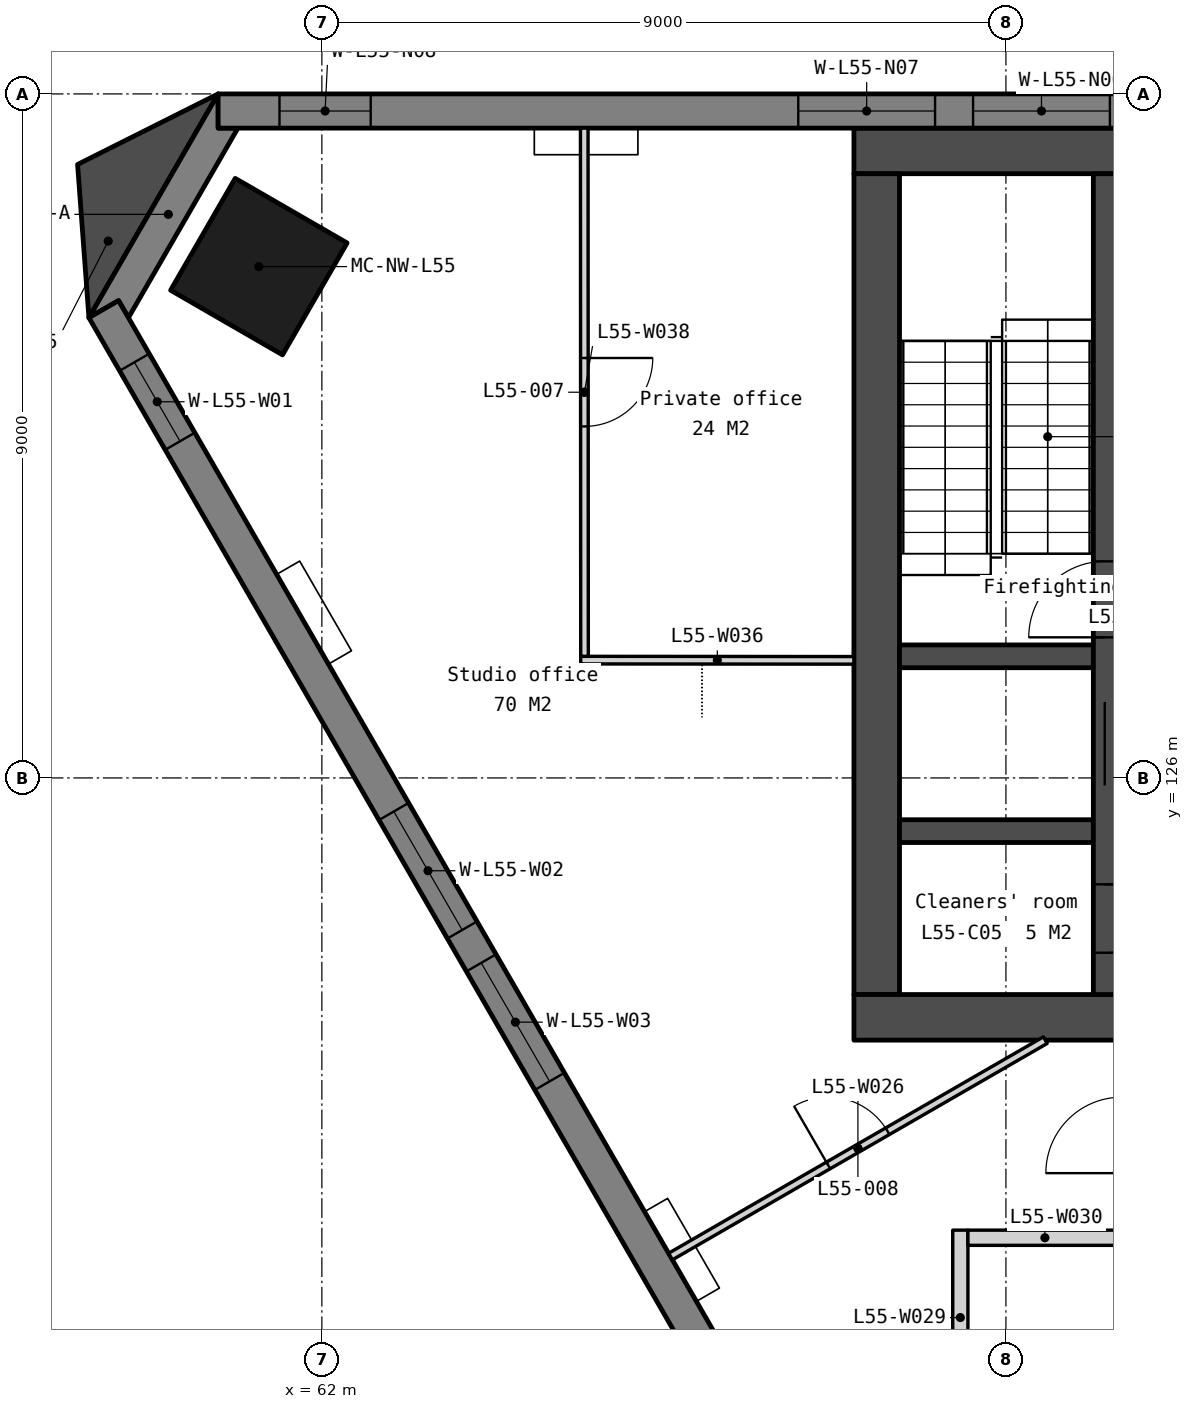
"""IFC4 building model, lengths in metres.
Left out: names, types, materials, properties, quantities, classifications, styles, units other than length and angle.
Written with IfcOpenShell. Run it as: python <this file> out.ifc"""

import sys

from ifc_helpers import new_model, si_unit, direction, frame, frame_2d, origin, origin_2d, place, context, subcontext, project, spatial, polyline, rectangle, outline, extrude, element, fill, save


model = new_model("IFC4")
c1 = context("Model", 3, precision=1e-05, world=origin(), true_north=direction((0.0, 1.0)))
c2 = subcontext(c1, "Body", "Model", "MODEL_VIEW")
j1 = project(units=[si_unit("LENGTHUNIT", "METRE"), si_unit("PLANEANGLEUNIT", "RADIAN")], contexts=[c1])
p1 = place(None, origin())
s1 = spatial("IfcSite", under=j1, at=p1, CompositionType="ELEMENT")
p2 = place(p1, origin())
s2 = spatial("IfcBuilding", under=s1, at=p2, CompositionType="ELEMENT")
p3 = place(p2, frame((0.0, 0.0, 219.2)))
s3 = spatial("IfcBuildingStorey", under=s2, at=p3, CompositionType="ELEMENT", Elevation=219.2)
p4 = place(p3, frame((61.171, 132.728, 0.0), z_axis=(0.0, 0.0, 1.0), x_axis=(-0.5, -0.866025403784, 0.0)))
e1 = element("IfcColumn", 1, at=p4, inside=s3, PredefinedType="COLUMN", context=c2, shape_type="SweptSolid", body=[
    extrude(rectangle(XDim=1.7, YDim=1.7, at=origin_2d()), origin(), (0.0, 0.0, 1.0), 3.9),
])
p5 = place(p3, frame((69.0, 134.25, 0.0), z_axis=(0.0, 0.0, 1.0), x_axis=(1.0, 0.0, 0.0)))
e2 = element("IfcWall", 2, at=p5, inside=s3, PredefinedType="SOLIDWALL", context=c2, shape_type="SweptSolid", body=[
    extrude(rectangle(XDim=22.0, YDim=0.6, at=frame_2d((11.0, 0.0))), origin(), (0.0, 0.0, 1.0), 3.75),
])
p6 = place(p3, frame((69.3, 133.95, 0.0), z_axis=(0.0, 0.0, 1.0), x_axis=(0.0, -1.0, 0.0)))
e3 = element("IfcWall", 3, at=p6, inside=s3, PredefinedType="SOLIDWALL", context=c2, shape_type="SweptSolid", body=[
    extrude(rectangle(XDim=10.8, YDim=0.6, at=frame_2d((5.4, 0.0))), origin(), (0.0, 0.0, 1.0), 3.75),
])
p7 = place(p3, frame((69.0, 122.85, 0.0), z_axis=(0.0, 0.0, 1.0), x_axis=(1.0, 0.0, 0.0)))
e4 = element("IfcWall", 4, at=p7, inside=s3, PredefinedType="SOLIDWALL", context=c2, shape_type="SweptSolid", body=[
    extrude(rectangle(XDim=22.0, YDim=0.6, at=frame_2d((11.0, 0.0))), origin(), (0.0, 0.0, 1.0), 3.75),
])
p8 = place(p7, frame((16.375, 0.0, 0.0)))
e5 = element("IfcOpeningElement", 5, at=p8, cuts=e4, PredefinedType="OPENING", context=c2, shape_type="SweptSolid", body=[
    extrude(rectangle(XDim=1.8, YDim=2.1, at=frame_2d((0.9, 1.05))), frame((0.0, 0.31, 0.0), z_axis=(0.0, -1.0, 0.0), x_axis=(1.0, 0.0, 0.0)), (0.0, 0.0, 1.0), 0.62),
])
p9 = place(p7, frame((3.825, 0.0, 0.0)))
e6 = element("IfcOpeningElement", 6, at=p9, cuts=e4, PredefinedType="OPENING", context=c2, shape_type="SweptSolid", body=[
    extrude(rectangle(XDim=1.8, YDim=2.1, at=frame_2d((0.9, 1.05))), frame((0.0, 0.31, 0.0), z_axis=(0.0, -1.0, 0.0), x_axis=(1.0, 0.0, 0.0)), (0.0, 0.0, 1.0), 0.62),
])
p10 = place(p7, frame((12.85, 0.0, 0.0)))
e7 = element("IfcOpeningElement", 7, at=p10, cuts=e4, PredefinedType="OPENING", context=c2, shape_type="SweptSolid", body=[
    extrude(rectangle(XDim=1.5, YDim=2.1, at=frame_2d((0.75, 1.05))), frame((0.0, 0.31, 0.0), z_axis=(0.0, -1.0, 0.0), x_axis=(1.0, 0.0, 0.0)), (0.0, 0.0, 1.0), 0.62),
])
for number, where, z_axis, x_axis in (
    (8, (69.6, 127.6, 0.0), (0.0, 0.0, 1.0), (1.0, 0.0, 0.0)),
    (9, (69.6, 125.3, 0.0), (0.0, 0.0, 1.0), (1.0, 0.0, 0.0)),
):
    element("IfcWall", number, at=place(p3, frame(where, z_axis=z_axis, x_axis=x_axis)), inside=s3, PredefinedType="SOLIDWALL", context=c2, shape_type="SweptSolid", body=[
        extrude(rectangle(XDim=2.55, YDim=0.3, at=frame_2d((1.275, 0.0))), origin(), (0.0, 0.0, 1.0), 3.75),
    ])
p11 = place(p3, frame((72.3, 133.95, 0.0), z_axis=(0.0, 0.0, 1.0), x_axis=(0.0, -1.0, 0.0)))
e10 = element("IfcWall", 10, at=p11, inside=s3, PredefinedType="SOLIDWALL", context=c2, shape_type="SweptSolid", body=[
    extrude(rectangle(XDim=10.8, YDim=0.3, at=frame_2d((5.4, 0.0))), origin(), (0.0, 0.0, 1.0), 3.75),
])
p12 = place(p11, frame((6.95, 0.0, 0.0)))
e11 = element("IfcOpeningElement", 11, at=p12, cuts=e10, PredefinedType="OPENING", context=c2, shape_type="SweptSolid", body=[
    extrude(rectangle(XDim=1.1, YDim=2.1, at=frame_2d((0.55, 1.05))), frame((0.0, 0.16, 0.0), z_axis=(0.0, -1.0, 0.0), x_axis=(1.0, 0.0, 0.0)), (0.0, 0.0, 1.0), 0.32),
])
p13 = place(p11, frame((9.35, 0.0, 0.0)))
e12 = element("IfcOpeningElement", 12, at=p13, cuts=e10, PredefinedType="OPENING", context=c2, shape_type="SweptSolid", body=[
    extrude(rectangle(XDim=0.9, YDim=2.1, at=frame_2d((0.45, 1.05))), frame((0.0, 0.16, 0.0), z_axis=(0.0, -1.0, 0.0), x_axis=(1.0, 0.0, 0.0)), (0.0, 0.0, 1.0), 0.32),
])
p14 = place(p11, frame((5.1, 0.0, 0.0)))
e13 = element("IfcOpeningElement", 13, at=p14, cuts=e10, PredefinedType="OPENING", context=c2, shape_type="SweptSolid", body=[
    extrude(rectangle(XDim=1.0, YDim=2.1, at=frame_2d((0.5, 1.05))), frame((0.0, 0.16, 0.0), z_axis=(0.0, -1.0, 0.0), x_axis=(1.0, 0.0, 0.0)), (0.0, 0.0, 1.0), 0.32),
])
p15 = place(p3, frame((0.0, 0.0, -0.15)))
e14 = element("IfcWall", 14, at=p15, inside=s3, PredefinedType="SOLIDWALL", context=c2, shape_type="SweptSolid", body=[
    extrude(outline(polyline([(60.635, 135.0), (60.635, 134.55), (60.895, 134.55), (59.455, 132.055), (59.325, 132.281), (58.935, 132.055), (60.635, 135.0)])), origin(), (0.0, 0.0, 1.0), 3.9),
])
p16 = place(p3, frame((99.365, 134.775, -0.15), z_axis=(0.0, 0.0, 1.0), x_axis=(-1.0, 0.0, 0.0)))
e15 = element("IfcWall", 15, at=p16, inside=s3, PredefinedType="SOLIDWALL", context=c2, shape_type="SweptSolid", body=[
    extrude(outline(polyline([(38.729, 0.0), (38.729, 3.9), (0.0, 3.9), (0.0, 0.0), (38.729, 0.0)])), frame((0.0, 0.225, 0.0), z_axis=(0.0, -1.0, 0.0), x_axis=(1.0, 0.0, 0.0)), (0.0, 0.0, 1.0), 0.45),
])
p17 = place(p16, frame((0.807, 0.0, 0.95)))
e16 = element("IfcOpeningElement", 16, at=p17, cuts=e15, PredefinedType="OPENING", context=c2, shape_type="SweptSolid", body=[
    extrude(rectangle(XDim=1.2, YDim=2.2, at=frame_2d((0.6, 1.1))), frame((0.0, 0.235, 0.0), z_axis=(0.0, -1.0, 0.0), x_axis=(1.0, 0.0, 0.0)), (0.0, 0.0, 1.0), 0.47),
])
p18 = place(p16, frame((7.632, 0.0, 0.95)))
e17 = element("IfcOpeningElement", 17, at=p18, cuts=e15, PredefinedType="OPENING", context=c2, shape_type="SweptSolid", body=[
    extrude(rectangle(XDim=1.8, YDim=2.2, at=frame_2d((0.9, 1.1))), frame((0.0, 0.235, 0.0), z_axis=(0.0, -1.0, 0.0), x_axis=(1.0, 0.0, 0.0)), (0.0, 0.0, 1.0), 0.47),
])
p19 = place(p16, frame((9.932, 0.0, 0.95)))
e18 = element("IfcOpeningElement", 18, at=p19, cuts=e15, PredefinedType="OPENING", context=c2, shape_type="SweptSolid", body=[
    extrude(rectangle(XDim=1.8, YDim=2.2, at=frame_2d((0.9, 1.1))), frame((0.0, 0.235, 0.0), z_axis=(0.0, -1.0, 0.0), x_axis=(1.0, 0.0, 0.0)), (0.0, 0.0, 1.0), 0.47),
])
p20 = place(p16, frame((17.315, 0.0, 0.95)))
e19 = element("IfcOpeningElement", 19, at=p20, cuts=e15, PredefinedType="OPENING", context=c2, shape_type="SweptSolid", body=[
    extrude(rectangle(XDim=1.8, YDim=2.2, at=frame_2d((0.9, 1.1))), frame((0.0, 0.235, 0.0), z_axis=(0.0, -1.0, 0.0), x_axis=(1.0, 0.0, 0.0)), (0.0, 0.0, 1.0), 0.47),
])
p21 = place(p16, frame((19.615, 0.0, 0.95)))
e20 = element("IfcOpeningElement", 20, at=p21, cuts=e15, PredefinedType="OPENING", context=c2, shape_type="SweptSolid", body=[
    extrude(rectangle(XDim=1.8, YDim=2.2, at=frame_2d((0.9, 1.1))), frame((0.0, 0.235, 0.0), z_axis=(0.0, -1.0, 0.0), x_axis=(1.0, 0.0, 0.0)), (0.0, 0.0, 1.0), 0.47),
])
p22 = place(p16, frame((26.997, 0.0, 0.95)))
e21 = element("IfcOpeningElement", 21, at=p22, cuts=e15, PredefinedType="OPENING", context=c2, shape_type="SweptSolid", body=[
    extrude(rectangle(XDim=1.8, YDim=2.2, at=frame_2d((0.9, 1.1))), frame((0.0, 0.235, 0.0), z_axis=(0.0, -1.0, 0.0), x_axis=(1.0, 0.0, 0.0)), (0.0, 0.0, 1.0), 0.47),
])
p23 = place(p16, frame((29.297, 0.0, 0.95)))
e22 = element("IfcOpeningElement", 22, at=p23, cuts=e15, PredefinedType="OPENING", context=c2, shape_type="SweptSolid", body=[
    extrude(rectangle(XDim=1.8, YDim=2.2, at=frame_2d((0.9, 1.1))), frame((0.0, 0.235, 0.0), z_axis=(0.0, -1.0, 0.0), x_axis=(1.0, 0.0, 0.0)), (0.0, 0.0, 1.0), 0.47),
])
p24 = place(p16, frame((36.722, 0.0, 0.95)))
e23 = element("IfcOpeningElement", 23, at=p24, cuts=e15, PredefinedType="OPENING", context=c2, shape_type="SweptSolid", body=[
    extrude(rectangle(XDim=1.2, YDim=2.2, at=frame_2d((0.6, 1.1))), frame((0.0, 0.235, 0.0), z_axis=(0.0, -1.0, 0.0), x_axis=(1.0, 0.0, 0.0)), (0.0, 0.0, 1.0), 0.47),
])
p25 = place(p3, frame((59.13, 132.168, -0.15), z_axis=(0.0, 0.0, 1.0), x_axis=(0.500002199942, -0.866024133644, 0.0)))
e24 = element("IfcWall", 24, at=p25, inside=s3, PredefinedType="SOLIDWALL", context=c2, shape_type="SweptSolid", body=[
    extrude(outline(polyline([(38.729, 0.0), (38.729, 3.9), (0.0, 3.9), (0.0, 0.0), (38.729, 0.0)])), frame((0.0, 0.225, 0.0), z_axis=(0.0, -1.0, 0.0), x_axis=(1.0, 0.0, 0.0)), (0.0, 0.0, 1.0), 0.45),
])
p26 = place(p25, frame((0.807, 0.0, 0.95)))
e25 = element("IfcOpeningElement", 25, at=p26, cuts=e24, PredefinedType="OPENING", context=c2, shape_type="SweptSolid", body=[
    extrude(rectangle(XDim=1.2, YDim=2.2, at=frame_2d((0.6, 1.1))), frame((0.0, 0.235, 0.0), z_axis=(0.0, -1.0, 0.0), x_axis=(1.0, 0.0, 0.0)), (0.0, 0.0, 1.0), 0.47),
])
p27 = place(p25, frame((7.632, 0.0, 0.95)))
e26 = element("IfcOpeningElement", 26, at=p27, cuts=e24, PredefinedType="OPENING", context=c2, shape_type="SweptSolid", body=[
    extrude(rectangle(XDim=1.8, YDim=2.2, at=frame_2d((0.9, 1.1))), frame((0.0, 0.235, 0.0), z_axis=(0.0, -1.0, 0.0), x_axis=(1.0, 0.0, 0.0)), (0.0, 0.0, 1.0), 0.47),
])
p28 = place(p25, frame((9.932, 0.0, 0.95)))
e27 = element("IfcOpeningElement", 27, at=p28, cuts=e24, PredefinedType="OPENING", context=c2, shape_type="SweptSolid", body=[
    extrude(rectangle(XDim=1.8, YDim=2.2, at=frame_2d((0.9, 1.1))), frame((0.0, 0.235, 0.0), z_axis=(0.0, -1.0, 0.0), x_axis=(1.0, 0.0, 0.0)), (0.0, 0.0, 1.0), 0.47),
])
p29 = place(p25, frame((17.315, 0.0, 0.95)))
e28 = element("IfcOpeningElement", 28, at=p29, cuts=e24, PredefinedType="OPENING", context=c2, shape_type="SweptSolid", body=[
    extrude(rectangle(XDim=1.8, YDim=2.2, at=frame_2d((0.9, 1.1))), frame((0.0, 0.235, 0.0), z_axis=(0.0, -1.0, 0.0), x_axis=(1.0, 0.0, 0.0)), (0.0, 0.0, 1.0), 0.47),
])
p30 = place(p25, frame((19.615, 0.0, 0.95)))
e29 = element("IfcOpeningElement", 29, at=p30, cuts=e24, PredefinedType="OPENING", context=c2, shape_type="SweptSolid", body=[
    extrude(rectangle(XDim=1.8, YDim=2.2, at=frame_2d((0.9, 1.1))), frame((0.0, 0.235, 0.0), z_axis=(0.0, -1.0, 0.0), x_axis=(1.0, 0.0, 0.0)), (0.0, 0.0, 1.0), 0.47),
])
p31 = place(p25, frame((26.997, 0.0, 0.95)))
e30 = element("IfcOpeningElement", 30, at=p31, cuts=e24, PredefinedType="OPENING", context=c2, shape_type="SweptSolid", body=[
    extrude(rectangle(XDim=1.8, YDim=2.2, at=frame_2d((0.9, 1.1))), frame((0.0, 0.235, 0.0), z_axis=(0.0, -1.0, 0.0), x_axis=(1.0, 0.0, 0.0)), (0.0, 0.0, 1.0), 0.47),
])
p32 = place(p25, frame((29.297, 0.0, 0.95)))
e31 = element("IfcOpeningElement", 31, at=p32, cuts=e24, PredefinedType="OPENING", context=c2, shape_type="SweptSolid", body=[
    extrude(rectangle(XDim=1.8, YDim=2.2, at=frame_2d((0.9, 1.1))), frame((0.0, 0.235, 0.0), z_axis=(0.0, -1.0, 0.0), x_axis=(1.0, 0.0, 0.0)), (0.0, 0.0, 1.0), 0.47),
])
p33 = place(p25, frame((36.722, 0.0, 0.95)))
e32 = element("IfcOpeningElement", 32, at=p33, cuts=e24, PredefinedType="OPENING", context=c2, shape_type="SweptSolid", body=[
    extrude(rectangle(XDim=1.2, YDim=2.2, at=frame_2d((0.6, 1.1))), frame((0.0, 0.235, 0.0), z_axis=(0.0, -1.0, 0.0), x_axis=(1.0, 0.0, 0.0)), (0.0, 0.0, 1.0), 0.47),
])
p34 = place(p3, frame((0.0, 0.0, -0.15)))
e33 = element("IfcWall", 33, at=p34, inside=s3, PredefinedType="SOLIDWALL", context=c2, shape_type="SweptSolid", body=[
    extrude(outline(polyline([(60.635, 135.0), (58.786, 134.072), (58.935, 132.055), (60.635, 135.0)])), origin(), (0.0, 0.0, 1.0), 3.9),
])
p35 = place(p3, frame((66.587, 119.703, 0.0), z_axis=(0.0, 0.0, 1.0), x_axis=(0.866023511746, 0.500003277092, 0.0)))
e34 = element("IfcWall", 34, at=p35, inside=s3, PredefinedType="PARTITIONING", context=c2, shape_type="SweptSolid", body=[
    extrude(rectangle(XDim=5.694, YDim=0.1, at=frame_2d((2.847, 0.0))), origin(), (0.0, 0.0, 1.0), 3.75),
])
p36 = place(p35, frame((2.397, 0.0, 0.0)))
e35 = element("IfcOpeningElement", 35, at=p36, cuts=e34, PredefinedType="OPENING", context=c2, shape_type="SweptSolid", body=[
    extrude(rectangle(XDim=0.9, YDim=2.1, at=frame_2d((0.45, 1.05))), frame((0.0, 0.06, 0.0), z_axis=(0.0, -1.0, 0.0), x_axis=(1.0, 0.0, 0.0)), (0.0, 0.0, 1.0), 0.12),
])
p37 = place(p3, frame((70.4, 117.75, 0.0), z_axis=(0.0, 0.0, 1.0), x_axis=(0.0, 1.0, 0.0)))
e36 = element("IfcWall", 36, at=p37, inside=s3, PredefinedType="PARTITIONING", context=c2, shape_type="SweptSolid", body=[
    extrude(rectangle(XDim=2.3, YDim=0.2, at=frame_2d((1.15, 0.0))), origin(), (0.0, 0.0, 1.0), 3.75),
])
p38 = place(p3, frame((70.5, 119.95, 0.0), z_axis=(0.0, 0.0, 1.0), x_axis=(1.0, 0.0, 0.0)))
e37 = element("IfcWall", 37, at=p38, inside=s3, PredefinedType="PARTITIONING", context=c2, shape_type="SweptSolid", body=[
    extrude(rectangle(XDim=2.025, YDim=0.2, at=frame_2d((1.012, 0.0))), origin(), (0.0, 0.0, 1.0), 3.75),
])
p39 = place(p3, frame((65.406, 127.55, 0.0), z_axis=(0.0, 0.0, 1.0), x_axis=(0.999999667846, -0.00081505101, 0.0)))
e38 = element("IfcWall", 38, at=p39, inside=s3, PredefinedType="PARTITIONING", context=c2, shape_type="SweptSolid", body=[
    extrude(rectangle(XDim=3.594, YDim=0.1, at=frame_2d((1.797, 0.0))), origin(), (0.0, 0.0, 1.0), 3.75),
])
p40 = place(p3, frame((65.452, 134.55, 0.0), z_axis=(0.0, 0.0, 1.0), x_axis=(0.000491814737, -0.999999879059, 0.0)))
e39 = element("IfcWall", 39, at=p40, inside=s3, PredefinedType="PARTITIONING", context=c2, shape_type="SweptSolid", body=[
    extrude(rectangle(XDim=6.95, YDim=0.1, at=frame_2d((3.475, 0.0))), origin(), (0.0, 0.0, 1.0), 3.75),
])
p41 = place(p40, frame((3.025, 0.0, 0.0)))
e40 = element("IfcOpeningElement", 40, at=p41, cuts=e39, PredefinedType="OPENING", context=c2, shape_type="SweptSolid", body=[
    extrude(rectangle(XDim=0.9, YDim=2.1, at=frame_2d((0.45, 1.05))), frame((0.0, 0.06, 0.0), z_axis=(0.0, -1.0, 0.0), x_axis=(1.0, 0.0, 0.0)), (0.0, 0.0, 1.0), 0.12),
])
p42 = place(p12, origin())
e41 = element("IfcDoor", 41, at=p42, inside=s3, OperationType="SLIDING_TO_LEFT", PredefinedType="DOOR", context=c2, shape_type="SweptSolid", body=[
    extrude(rectangle(XDim=1.1, YDim=2.1, at=frame_2d((0.55, 1.05))), frame((0.0, 0.025, 0.0), z_axis=(0.0, -1.0, 0.0), x_axis=(1.0, 0.0, 0.0)), (0.0, 0.0, 1.0), 0.05),
])
fill(e11, e41)
p43 = place(p13, origin())
e42 = element("IfcDoor", 42, at=p43, inside=s3, OperationType="SINGLE_SWING_LEFT", PredefinedType="DOOR", context=c2, shape_type="SweptSolid", body=[
    extrude(rectangle(XDim=0.9, YDim=2.1, at=frame_2d((0.45, 1.05))), frame((0.0, 0.025, 0.0), z_axis=(0.0, -1.0, 0.0), x_axis=(1.0, 0.0, 0.0)), (0.0, 0.0, 1.0), 0.05),
])
fill(e12, e42)
p44 = place(p14, origin())
e43 = element("IfcDoor", 43, at=p44, inside=s3, OperationType="SINGLE_SWING_RIGHT", PredefinedType="DOOR", context=c2, shape_type="SweptSolid", body=[
    extrude(rectangle(XDim=1.0, YDim=2.1, at=frame_2d((0.5, 1.05))), frame((0.0, 0.025, 0.0), z_axis=(0.0, -1.0, 0.0), x_axis=(1.0, 0.0, 0.0)), (0.0, 0.0, 1.0), 0.05),
])
fill(e13, e43)
p45 = place(p22, origin())
e44 = element("IfcWindow", 44, at=p45, inside=s3, PartitioningType="SINGLE_PANEL", PredefinedType="WINDOW", context=c2, shape_type="SweptSolid", body=[
    extrude(rectangle(XDim=1.8, YDim=2.2, at=frame_2d((0.9, 1.1))), frame((0.0, 0.03, 0.0), z_axis=(0.0, -1.0, 0.0), x_axis=(1.0, 0.0, 0.0)), (0.0, 0.0, 1.0), 0.06),
])
fill(e21, e44)
p46 = place(p23, origin())
e45 = element("IfcWindow", 45, at=p46, inside=s3, PartitioningType="SINGLE_PANEL", PredefinedType="WINDOW", context=c2, shape_type="SweptSolid", body=[
    extrude(rectangle(XDim=1.8, YDim=2.2, at=frame_2d((0.9, 1.1))), frame((0.0, 0.03, 0.0), z_axis=(0.0, -1.0, 0.0), x_axis=(1.0, 0.0, 0.0)), (0.0, 0.0, 1.0), 0.06),
])
fill(e22, e45)
p47 = place(p24, origin())
e46 = element("IfcWindow", 46, at=p47, inside=s3, PartitioningType="SINGLE_PANEL", PredefinedType="WINDOW", context=c2, shape_type="SweptSolid", body=[
    extrude(rectangle(XDim=1.2, YDim=2.2, at=frame_2d((0.6, 1.1))), frame((0.0, 0.03, 0.0), z_axis=(0.0, -1.0, 0.0), x_axis=(1.0, 0.0, 0.0)), (0.0, 0.0, 1.0), 0.06),
])
fill(e23, e46)
p48 = place(p26, origin())
e47 = element("IfcWindow", 47, at=p48, inside=s3, PartitioningType="SINGLE_PANEL", PredefinedType="WINDOW", context=c2, shape_type="SweptSolid", body=[
    extrude(rectangle(XDim=1.2, YDim=2.2, at=frame_2d((0.6, 1.1))), frame((0.0, 0.03, 0.0), z_axis=(0.0, -1.0, 0.0), x_axis=(1.0, 0.0, 0.0)), (0.0, 0.0, 1.0), 0.06),
])
fill(e25, e47)
p49 = place(p27, origin())
e48 = element("IfcWindow", 48, at=p49, inside=s3, PartitioningType="SINGLE_PANEL", PredefinedType="WINDOW", context=c2, shape_type="SweptSolid", body=[
    extrude(rectangle(XDim=1.8, YDim=2.2, at=frame_2d((0.9, 1.1))), frame((0.0, 0.03, 0.0), z_axis=(0.0, -1.0, 0.0), x_axis=(1.0, 0.0, 0.0)), (0.0, 0.0, 1.0), 0.06),
])
fill(e26, e48)
p50 = place(p28, origin())
e49 = element("IfcWindow", 49, at=p50, inside=s3, PartitioningType="SINGLE_PANEL", PredefinedType="WINDOW", context=c2, shape_type="SweptSolid", body=[
    extrude(rectangle(XDim=1.8, YDim=2.2, at=frame_2d((0.9, 1.1))), frame((0.0, 0.03, 0.0), z_axis=(0.0, -1.0, 0.0), x_axis=(1.0, 0.0, 0.0)), (0.0, 0.0, 1.0), 0.06),
])
fill(e27, e49)
p51 = place(p41, origin())
e50 = element("IfcDoor", 50, at=p51, inside=s3, OperationType="SINGLE_SWING_LEFT", PredefinedType="DOOR", context=c2, shape_type="SweptSolid", body=[
    extrude(rectangle(XDim=0.9, YDim=2.1, at=frame_2d((0.45, 1.05))), frame((0.0, 0.025, 0.0), z_axis=(0.0, -1.0, 0.0), x_axis=(1.0, 0.0, 0.0)), (0.0, 0.0, 1.0), 0.05),
])
fill(e40, e50)
p52 = place(p36, origin())
e51 = element("IfcDoor", 51, at=p52, inside=s3, OperationType="SINGLE_SWING_LEFT", PredefinedType="DOOR", context=c2, shape_type="SweptSolid", body=[
    extrude(rectangle(XDim=0.9, YDim=2.1, at=frame_2d((0.45, 1.05))), frame((0.0, 0.025, 0.0), z_axis=(0.0, -1.0, 0.0), x_axis=(1.0, 0.0, 0.0)), (0.0, 0.0, 1.0), 0.05),
])
fill(e35, e51)
save(model, sys.argv[1])
